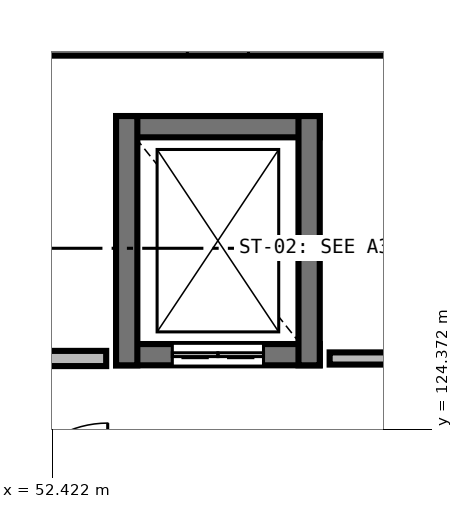
"""IFC4 building model, lengths in metres.
Left out: names, types, materials, properties, quantities, classifications, styles, units other than length and angle.
Written with IfcOpenShell. Run it as: python <this file> out.ifc"""

import sys

from ifc_helpers import new_model, si_unit, direction, frame, frame_2d, origin, place, context, subcontext, project, spatial, rectangle, extrude, element, fill, save


model = new_model("IFC4")
c1 = context("Model", 3, precision=1e-05, world=origin(), true_north=direction((0.0, 1.0)))
c2 = subcontext(c1, "Body", "Model", "MODEL_VIEW")
j1 = project(units=[si_unit("LENGTHUNIT", "METRE"), si_unit("PLANEANGLEUNIT", "RADIAN")], contexts=[c1])
p1 = place(None, origin())
s1 = spatial("IfcSite", under=j1, at=p1, CompositionType="ELEMENT")
p2 = place(p1, origin())
s2 = spatial("IfcBuilding", under=s1, at=p2, CompositionType="ELEMENT")
p3 = place(p2, frame((0.0, 0.0, 21.9)))
s3 = spatial("IfcBuildingStorey", under=s2, at=p3, CompositionType="ELEMENT", Elevation=21.9)
p4 = place(p3, frame((50.648, 129.43, 0.0), z_axis=(0.0, 0.0, 1.0), x_axis=(1.0, 0.0, 0.0)))
e1 = element("IfcWall", 1, at=p4, inside=s3, PredefinedType="SOLIDWALL", context=c2, shape_type="SweptSolid", body=[
    extrude(rectangle(XDim=7.904, YDim=0.29, at=frame_2d((3.952, 0.0))), origin(), (0.0, 0.0, 1.0), 3.25),
])
p5 = place(p4, frame((0.85, 0.0, 0.95)))
e2 = element("IfcOpeningElement", 2, at=p5, cuts=e1, PredefinedType="OPENING", context=c2, shape_type="SweptSolid", body=[
    extrude(rectangle(XDim=2.7, YDim=1.9, at=frame_2d((1.35, 0.95))), frame((0.0, 0.155, 0.0), z_axis=(0.0, -1.0, 0.0), x_axis=(1.0, 0.0, 0.0)), (0.0, 0.0, 1.0), 0.31),
])
p6 = place(p4, frame((4.354, 0.0, 0.95)))
e3 = element("IfcOpeningElement", 3, at=p6, cuts=e1, PredefinedType="OPENING", context=c2, shape_type="SweptSolid", body=[
    extrude(rectangle(XDim=2.7, YDim=1.9, at=frame_2d((1.35, 0.95))), frame((0.0, 0.155, 0.0), z_axis=(0.0, -1.0, 0.0), x_axis=(1.0, 0.0, 0.0)), (0.0, 0.0, 1.0), 0.31),
])
p7 = place(p3, frame((55.94, 125.35, 0.0), z_axis=(0.0, 0.0, 1.0), x_axis=(-1.0, 0.0, 0.0)))
e4 = element("IfcWall", 4, at=p7, inside=s3, PredefinedType="SHEAR", context=c2, shape_type="SweptSolid", body=[
    extrude(rectangle(XDim=2.68, YDim=0.28, at=frame_2d((1.34, 0.0))), origin(), (0.0, 0.0, 1.0), 3.88),
])
p8 = place(p7, frame((0.74, 0.0, 0.0)))
e5 = element("IfcOpeningElement", 5, at=p8, cuts=e4, PredefinedType="OPENING", context=c2, shape_type="SweptSolid", body=[
    extrude(rectangle(XDim=1.2, YDim=2.15, at=frame_2d((0.6, 1.075))), frame((0.0, 0.15, 0.0), z_axis=(0.0, -1.0, 0.0), x_axis=(1.0, 0.0, 0.0)), (0.0, 0.0, 1.0), 0.3),
])
p9 = place(p3, frame((53.26, 128.35, 0.0), z_axis=(0.0, 0.0, 1.0), x_axis=(1.0, 0.0, 0.0)))
e6 = element("IfcWall", 6, at=p9, inside=s3, PredefinedType="SHEAR", context=c2, shape_type="SweptSolid", body=[
    extrude(rectangle(XDim=2.68, YDim=0.28, at=frame_2d((1.34, 0.0))), origin(), (0.0, 0.0, 1.0), 3.88),
])
for number, where, z_axis, x_axis in (
    (7, (53.4, 125.21, 0.0), (0.0, 0.0, 1.0), (0.0, 1.0, 0.0)),
    (8, (55.8, 128.49, 0.0), (0.0, 0.0, 1.0), (0.0, -1.0, 0.0)),
):
    element("IfcWall", number, at=place(p3, frame(where, z_axis=z_axis, x_axis=x_axis)), inside=s3, PredefinedType="SHEAR", context=c2, shape_type="SweptSolid", body=[
        extrude(rectangle(XDim=3.28, YDim=0.28, at=frame_2d((1.64, 0.0))), origin(), (0.0, 0.0, 1.0), 3.88),
    ])
p10 = place(p3, frame((33.6, 125.3, 0.0), z_axis=(0.0, 0.0, 1.0), x_axis=(1.0, 0.0, 0.0)))
e9 = element("IfcWall", 9, at=p10, inside=s3, PredefinedType="SOLIDWALL", context=c2, shape_type="SweptSolid", body=[
    extrude(rectangle(XDim=19.53, YDim=0.2, at=frame_2d((9.765, 0.0))), origin(), (0.0, 0.0, 1.0), 3.455),
])
p11 = place(p10, frame((3.475, 0.0, 0.0)))
e10 = element("IfcOpeningElement", 10, at=p11, cuts=e9, PredefinedType="OPENING", context=c2, shape_type="SweptSolid", body=[
    extrude(rectangle(XDim=1.45, YDim=2.2, at=frame_2d((0.725, 1.1))), frame((0.0, 0.11, 0.0), z_axis=(0.0, -1.0, 0.0), x_axis=(1.0, 0.0, 0.0)), (0.0, 0.0, 1.0), 0.22),
])
p12 = place(p3, frame((56.07, 125.3, 0.0), z_axis=(0.0, 0.0, 1.0), x_axis=(1.0, 0.0, 0.0)))
e11 = element("IfcWall", 11, at=p12, inside=s3, PredefinedType="PARTITIONING", context=c2, shape_type="SweptSolid", body=[
    extrude(rectangle(XDim=11.13, YDim=0.16, at=frame_2d((5.565, 0.0))), origin(), (0.0, 0.0, 1.0), 3.455),
])
p13 = place(p8, origin())
e12 = element("IfcDoor", 12, at=p13, inside=s3, OperationType="DOUBLE_DOOR_SLIDING", PredefinedType="DOOR", context=c2, shape_type="SweptSolid", body=[
    extrude(rectangle(XDim=1.2, YDim=2.15, at=frame_2d((0.6, 1.075))), frame((0.0, 0.025, 0.0), z_axis=(0.0, -1.0, 0.0), x_axis=(1.0, 0.0, 0.0)), (0.0, 0.0, 1.0), 0.05),
])
fill(e5, e12)
save(model, sys.argv[1])
